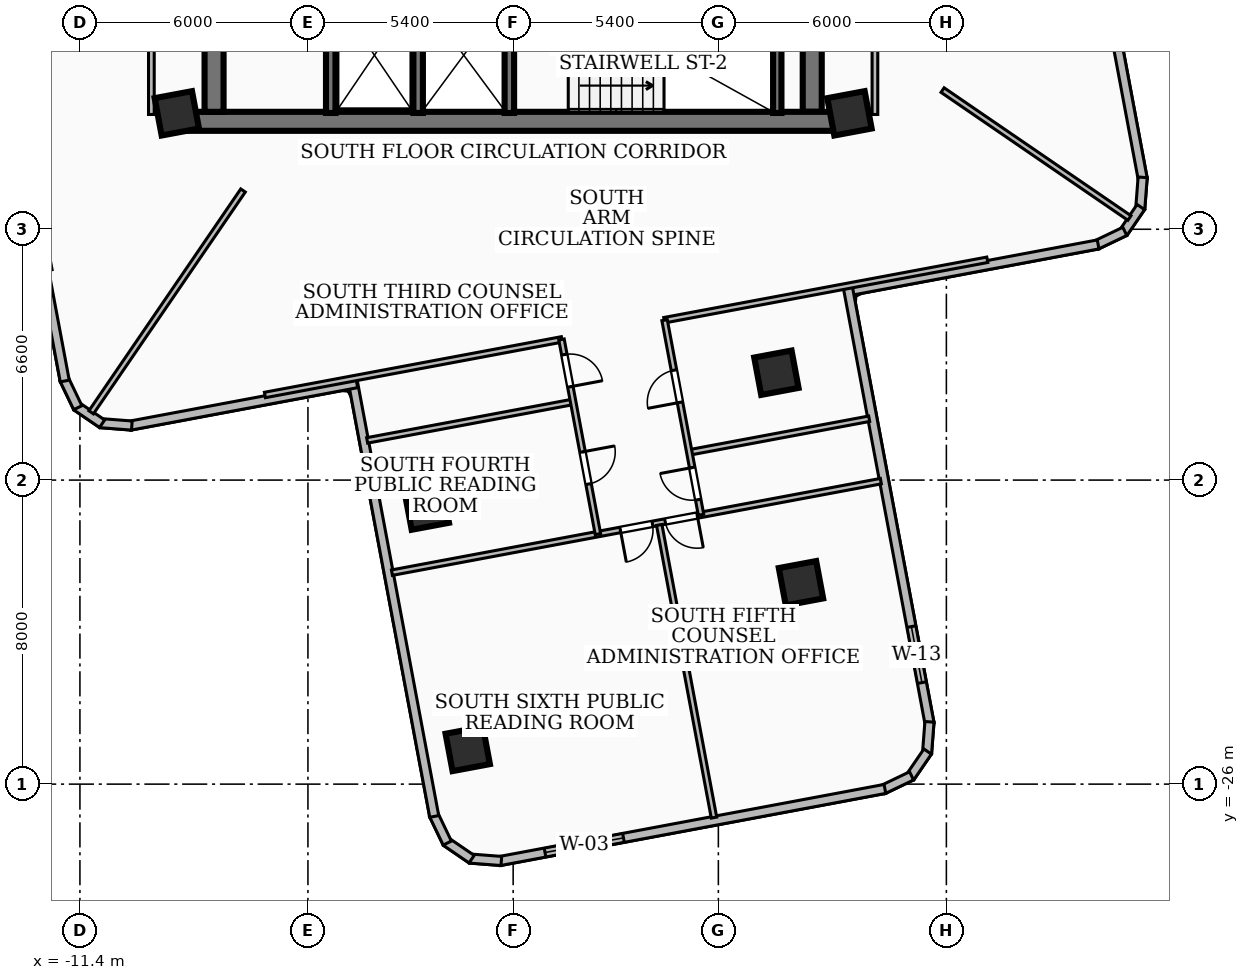
"""IFC4 building model, lengths in metres.
Left out: names, types, materials, properties, quantities, classifications, styles, units other than length and angle.
Written with IfcOpenShell. Run it as: python <this file> out.ifc"""

import sys

from ifc_helpers import new_model, si_unit, direction, frame, frame_2d, origin, origin_2d, place, context, subcontext, project, spatial, rectangle, extrude, element, fill, save


model = new_model("IFC4")
c1 = context("Model", 3, precision=1e-05, world=origin(), true_north=direction((0.0, 1.0)))
c2 = subcontext(c1, "Body", "Model", "MODEL_VIEW")
j1 = project(units=[si_unit("LENGTHUNIT", "METRE"), si_unit("PLANEANGLEUNIT", "RADIAN")], contexts=[c1])
p1 = place(None, origin())
s1 = spatial("IfcSite", under=j1, at=p1, CompositionType="ELEMENT")
p2 = place(p1, origin())
s2 = spatial("IfcBuilding", under=s1, at=p2, CompositionType="ELEMENT")
p3 = place(p2, frame((0.0, 0.0, 103.68)))
s3 = spatial("IfcBuildingStorey", under=s2, at=p3, CompositionType="ELEMENT", Elevation=103.68)
p4 = place(p3, frame((8.78, -8.56, 0.0), z_axis=(0.0, 0.0, 1.0), x_axis=(-1.0, 0.0, 0.0)))
e1 = element("IfcWall", 1, at=p4, inside=s3, PredefinedType="SHEAR", context=c2, shape_type="SweptSolid", body=[
    extrude(rectangle(XDim=17.56, YDim=0.5, at=frame_2d((8.78, 0.0))), origin(), (0.0, 0.0, 1.0), 3.2),
])
for number, where, z_axis, x_axis in (
    (2, (-7.87, -8.31, 0.0), (0.0, 0.0, 1.0), (0.0, 1.0, 0.0)),
    (3, (7.87, -2.0, 0.0), (0.0, 0.0, 1.0), (0.0, -1.0, 0.0)),
):
    element("IfcWall", number, at=place(p3, frame(where, z_axis=z_axis, x_axis=x_axis)), inside=s3, PredefinedType="SHEAR", context=c2, shape_type="SweptSolid", body=[
        extrude(rectangle(XDim=6.31, YDim=0.5, at=frame_2d((3.155, 0.0))), origin(), (0.0, 0.0, 1.0), 3.2),
    ])
p5 = place(p3, frame((6.95, -8.34, 0.0), z_axis=(0.0, 0.0, 1.0), x_axis=(0.0, 1.0, 0.0)))
e4 = element("IfcWall", 4, at=p5, inside=s3, PredefinedType="SOLIDWALL", context=c2, shape_type="SweptSolid", body=[
    extrude(rectangle(XDim=3.06, YDim=0.22, at=frame_2d((1.53, 0.0))), origin(), (0.0, 0.0, 1.0), 3.2),
])
for number, where, z_axis, x_axis in (
    (5, (-0.1, -8.34, 0.0), (0.0, 0.0, 1.0), (0.0, 1.0, 0.0)),
    (6, (-2.5, -8.34, 0.0), (0.0, 0.0, 1.0), (0.0, 1.0, 0.0)),
    (7, (-4.8, -8.34, 0.0), (0.0, 0.0, 1.0), (0.0, 1.0, 0.0)),
):
    element("IfcWall", number, at=place(p3, frame(where, z_axis=z_axis, x_axis=x_axis)), inside=s3, PredefinedType="SOLIDWALL", context=c2, shape_type="SweptSolid", body=[
        extrude(rectangle(XDim=3.04, YDim=0.25, at=frame_2d((1.52, 0.0))), origin(), (0.0, 0.0, 1.0), 3.2),
    ])
for number, where, z_axis, x_axis in (
    (8, (8.85, -8.35, 0.0), (0.0, 0.0, 1.0), (0.983, 0.184, 0.0)),
    (9, (-8.85, -8.35, 0.0), (0.0, 0.0, 1.0), (0.983, 0.184, 0.0)),
    (10, (-2.271, -18.724, 0.0), (0.0, 0.0, 1.0), (0.983, 0.184, 0.0)),
    (11, (6.927, -15.175, 0.0), (0.0, 0.0, 1.0), (0.983, 0.184, 0.0)),
    (12, (-1.195, -25.074, 0.0), (0.0, 0.0, 1.0), (0.983, 0.184, 0.0)),
    (13, (7.574, -20.714, 0.0), (0.0, 0.0, 1.0), (0.983, 0.184, 0.0)),
):
    element("IfcColumn", number, at=place(p3, frame(where, z_axis=z_axis, x_axis=x_axis)), inside=s3, PredefinedType="COLUMN", context=c2, shape_type="SweptSolid", body=[
        extrude(rectangle(XDim=1.0, YDim=1.0, at=origin_2d()), origin(), (0.0, 0.0, 1.0), 3.6),
    ])
p6 = place(p3, frame((15.45, -4.113, 0.0), z_axis=(0.0, 0.0, 1.0), x_axis=(0.18406771587, -0.982913564854, 0.0)))
e14 = element("IfcWall", 14, at=p6, inside=s3, PredefinedType="SOLIDWALL", context=c2, shape_type="SweptSolid", body=[
    extrude(rectangle(XDim=6.075, YDim=0.24, at=frame_2d((3.037, 0.0))), origin(), (0.0, 0.0, 1.0), 3.2),
])
p7 = place(p3, frame((16.565, -10.034, 0.0), z_axis=(0.0, 0.0, 1.0), x_axis=(-0.077011179273, -0.997030229365, 0.0)))
e15 = element("IfcWall", 15, at=p7, inside=s3, PredefinedType="SOLIDWALL", context=c2, shape_type="SweptSolid", body=[
    extrude(rectangle(XDim=0.831, YDim=0.24, at=frame_2d((0.415, 0.0))), origin(), (0.0, 0.0, 1.0), 3.2),
])
p8 = place(p3, frame((16.517, -10.816, 0.0), z_axis=(0.0, 0.0, 1.0), x_axis=(-0.563941688624, -0.825814611055, 0.0)))
e16 = element("IfcWall", 16, at=p8, inside=s3, PredefinedType="SOLIDWALL", context=c2, shape_type="SweptSolid", body=[
    extrude(rectangle(XDim=0.814, YDim=0.24, at=frame_2d((0.407, 0.0))), origin(), (0.0, 0.0, 1.0), 3.2),
])
p9 = place(p3, frame((16.095, -11.456, 0.0), z_axis=(0.0, 0.0, 1.0), x_axis=(-0.902044756706, -0.431642510533, 0.0)))
e17 = element("IfcWall", 17, at=p9, inside=s3, PredefinedType="SOLIDWALL", context=c2, shape_type="SweptSolid", body=[
    extrude(rectangle(XDim=0.832, YDim=0.24, at=frame_2d((0.416, 0.0))), origin(), (0.0, 0.0, 1.0), 3.2),
])
p10 = place(p3, frame((15.393, -11.799, 0.0), z_axis=(0.0, 0.0, 1.0), x_axis=(-0.982891759821, -0.184184115697, 0.0)))
e18 = element("IfcWall", 18, at=p10, inside=s3, PredefinedType="SOLIDWALL", context=c2, shape_type="SweptSolid", body=[
    extrude(rectangle(XDim=6.776, YDim=0.24, at=frame_2d((3.388, 0.0))), origin(), (0.0, 0.0, 1.0), 3.2),
])
p11 = place(p3, frame((8.809, -12.935, 0.0), z_axis=(0.0, 0.0, 1.0), x_axis=(0.184057484564, -0.98291548079, 0.0)))
e19 = element("IfcWall", 19, at=p11, inside=s3, PredefinedType="SOLIDWALL", context=c2, shape_type="SweptSolid", body=[
    extrude(rectangle(XDim=11.675, YDim=0.24, at=frame_2d((5.838, 0.0))), origin(), (0.0, 0.0, 1.0), 3.2),
])
p12 = place(p11, frame((9.075, 0.0, 0.85)))
e20 = element("IfcOpeningElement", 20, at=p12, cuts=e19, PredefinedType="OPENING", context=c2, shape_type="SweptSolid", body=[
    extrude(rectangle(XDim=1.5, YDim=1.8, at=frame_2d((0.75, 0.9))), frame((0.0, 0.13, 0.0), z_axis=(0.0, -1.0, 0.0), x_axis=(1.0, 0.0, 0.0)), (0.0, 0.0, 1.0), 0.26),
])
p13 = place(p3, frame((10.955, -24.361, 0.0), z_axis=(0.0, 0.0, 1.0), x_axis=(-0.077033754987, -0.997028485347, 0.0)))
e21 = element("IfcWall", 21, at=p13, inside=s3, PredefinedType="SOLIDWALL", context=c2, shape_type="SweptSolid", body=[
    extrude(rectangle(XDim=0.83, YDim=0.24, at=frame_2d((0.415, 0.0))), origin(), (0.0, 0.0, 1.0), 3.2),
])
p14 = place(p3, frame((10.907, -25.143, 0.0), z_axis=(0.0, 0.0, 1.0), x_axis=(-0.564898876177, -0.825160141847, 0.0)))
e22 = element("IfcWall", 22, at=p14, inside=s3, PredefinedType="SOLIDWALL", context=c2, shape_type="SweptSolid", body=[
    extrude(rectangle(XDim=0.814, YDim=0.24, at=frame_2d((0.407, 0.0))), origin(), (0.0, 0.0, 1.0), 3.2),
])
p15 = place(p3, frame((10.484, -25.783, 0.0), z_axis=(0.0, 0.0, 1.0), x_axis=(-0.901656054187, -0.432453881874, 0.0)))
e23 = element("IfcWall", 23, at=p15, inside=s3, PredefinedType="SOLIDWALL", context=c2, shape_type="SweptSolid", body=[
    extrude(rectangle(XDim=0.831, YDim=0.24, at=frame_2d((0.415, 0.0))), origin(), (0.0, 0.0, 1.0), 3.2),
])
p16 = place(p3, frame((9.783, -26.126, 0.0), z_axis=(0.0, 0.0, 1.0), x_axis=(-0.98292624202, -0.184000007471, 0.0)))
e24 = element("IfcWall", 24, at=p16, inside=s3, PredefinedType="SOLIDWALL", context=c2, shape_type="SweptSolid", body=[
    extrude(rectangle(XDim=10.32, YDim=0.24, at=frame_2d((5.16, 0.0))), origin(), (0.0, 0.0, 1.0), 3.2),
])
p17 = place(p16, frame((7.0, 0.0, 0.85)))
e25 = element("IfcOpeningElement", 25, at=p17, cuts=e24, PredefinedType="OPENING", context=c2, shape_type="SweptSolid", body=[
    extrude(rectangle(XDim=2.1, YDim=2.0, at=frame_2d((1.05, 1.0))), frame((0.0, 0.13, 0.0), z_axis=(0.0, -1.0, 0.0), x_axis=(1.0, 0.0, 0.0)), (0.0, 0.0, 1.0), 0.26),
])
p18 = place(p3, frame((-0.311, -28.022, 0.0), z_axis=(0.0, 0.0, 1.0), x_axis=(-0.997028485347, 0.077033754987, 0.0)))
e26 = element("IfcWall", 26, at=p18, inside=s3, PredefinedType="SOLIDWALL", context=c2, shape_type="SweptSolid", body=[
    extrude(rectangle(XDim=0.83, YDim=0.24, at=frame_2d((0.415, 0.0))), origin(), (0.0, 0.0, 1.0), 3.2),
])
p19 = place(p3, frame((-1.093, -27.974, 0.0), z_axis=(0.0, 0.0, 1.0), x_axis=(-0.825020375165, 0.565102982263, 0.0)))
e27 = element("IfcWall", 27, at=p19, inside=s3, PredefinedType="SOLIDWALL", context=c2, shape_type="SweptSolid", body=[
    extrude(rectangle(XDim=0.814, YDim=0.24, at=frame_2d((0.407, 0.0))), origin(), (0.0, 0.0, 1.0), 3.2),
])
p20 = place(p3, frame((-1.733, -27.551, 0.0), z_axis=(0.0, 0.0, 1.0), x_axis=(-0.432339276243, 0.901711012585, 0.0)))
e28 = element("IfcWall", 28, at=p20, inside=s3, PredefinedType="SOLIDWALL", context=c2, shape_type="SweptSolid", body=[
    extrude(rectangle(XDim=0.831, YDim=0.24, at=frame_2d((0.415, 0.0))), origin(), (0.0, 0.0, 1.0), 3.2),
])
p21 = place(p3, frame((-2.076, -26.85, 0.0), z_axis=(0.0, 0.0, 1.0), x_axis=(-0.18407390356, 0.982912406081, 0.0)))
e29 = element("IfcWall", 29, at=p21, inside=s3, PredefinedType="SOLIDWALL", context=c2, shape_type="SweptSolid", body=[
    extrude(rectangle(XDim=11.676, YDim=0.24, at=frame_2d((5.838, 0.0))), origin(), (0.0, 0.0, 1.0), 2.346),
])
p22 = place(p3, frame((-4.113, -15.45, 0.0), z_axis=(0.0, 0.0, 1.0), x_axis=(-0.982913564854, -0.18406771587, 0.0)))
e30 = element("IfcWall", 30, at=p22, inside=s3, PredefinedType="SOLIDWALL", context=c2, shape_type="SweptSolid", body=[
    extrude(rectangle(XDim=6.075, YDim=0.24, at=frame_2d((3.037, 0.0))), origin(), (0.0, 0.0, 1.0), 2.346),
])
p23 = place(p3, frame((-10.034, -16.565, 0.0), z_axis=(0.0, 0.0, 1.0), x_axis=(-0.997030229365, 0.077011179273, 0.0)))
e31 = element("IfcWall", 31, at=p23, inside=s3, PredefinedType="SOLIDWALL", context=c2, shape_type="SweptSolid", body=[
    extrude(rectangle(XDim=0.831, YDim=0.24, at=frame_2d((0.415, 0.0))), origin(), (0.0, 0.0, 1.0), 3.2),
])
p24 = place(p3, frame((-10.816, -16.517, 0.0), z_axis=(0.0, 0.0, 1.0), x_axis=(-0.825814611055, 0.563941688624, 0.0)))
e32 = element("IfcWall", 32, at=p24, inside=s3, PredefinedType="SOLIDWALL", context=c2, shape_type="SweptSolid", body=[
    extrude(rectangle(XDim=0.814, YDim=0.24, at=frame_2d((0.407, 0.0))), origin(), (0.0, 0.0, 1.0), 3.2),
])
p25 = place(p3, frame((-11.456, -16.095, 0.0), z_axis=(0.0, 0.0, 1.0), x_axis=(-0.431642510533, 0.902044756706, 0.0)))
e33 = element("IfcWall", 33, at=p25, inside=s3, PredefinedType="SOLIDWALL", context=c2, shape_type="SweptSolid", body=[
    extrude(rectangle(XDim=0.832, YDim=0.24, at=frame_2d((0.416, 0.0))), origin(), (0.0, 0.0, 1.0), 3.2),
])
p26 = place(p3, frame((-11.799, -15.393, 0.0), z_axis=(0.0, 0.0, 1.0), x_axis=(-0.184184115697, 0.982891759821, 0.0)))
e34 = element("IfcWall", 34, at=p26, inside=s3, PredefinedType="SOLIDWALL", context=c2, shape_type="SweptSolid", body=[
    extrude(rectangle(XDim=6.776, YDim=0.24, at=frame_2d((3.388, 0.0))), origin(), (0.0, 0.0, 1.0), 3.2),
])
for number, where, z_axis, x_axis in (
    (35, (-9.52, -8.38, 0.0), (0.0, 0.0, 1.0), (0.0, 1.0, 0.0)),
    (36, (9.52, -8.38, 0.0), (0.0, 0.0, 1.0), (0.0, 1.0, 0.0)),
):
    element("IfcWall", number, at=place(p3, frame(where, z_axis=z_axis, x_axis=x_axis)), inside=s3, PredefinedType="PARTITIONING", context=c2, shape_type="SweptSolid", body=[
        extrude(rectangle(XDim=6.63, YDim=0.15, at=frame_2d((3.315, 0.0))), origin(), (0.0, 0.0, 1.0), 2.346),
    ])
p27 = place(p3, frame((-7.108, -10.38, 0.0), z_axis=(0.0, 0.0, 1.0), x_axis=(-0.564900413187, -0.825159089619, 0.0)))
e37 = element("IfcWall", 37, at=p27, inside=s3, PredefinedType="PARTITIONING", context=c2, shape_type="SweptSolid", body=[
    extrude(rectangle(XDim=7.074, YDim=0.145, at=frame_2d((3.537, 0.0))), origin(), (0.0, 0.0, 1.0), 2.346),
])
p28 = place(p3, frame((11.3, -7.738, 0.0), z_axis=(0.0, 0.0, 1.0), x_axis=(0.825173577049, -0.564879250584, 0.0)))
e38 = element("IfcWall", 38, at=p28, inside=s3, PredefinedType="PARTITIONING", context=c2, shape_type="SweptSolid", body=[
    extrude(rectangle(XDim=5.959, YDim=0.145, at=frame_2d((2.979, 0.0))), origin(), (0.0, 0.0, 1.0), 3.2),
])
for number, where, z_axis, x_axis in (
    (39, (-13.794, -3.975, 0.0), (0.0, 0.0, 1.0), (0.184, -0.983, 0.0)),
    (40, (3.975, -13.794, 0.0), (0.0, 0.0, 1.0), (0.983, 0.184, 0.0)),
):
    element("IfcWall", number, at=place(p3, frame(where, z_axis=z_axis, x_axis=x_axis)), inside=s3, PredefinedType="PARTITIONING", context=c2, shape_type="SweptSolid", body=[
        extrude(rectangle(XDim=8.65, YDim=0.145, at=frame_2d((4.325, 0.0))), origin(), (0.0, 0.0, 1.0), 2.346),
    ])
p29 = place(p3, frame((-6.532, -15.761, 0.0), z_axis=(0.0, 0.0, 1.0), x_axis=(0.98292290903, 0.184017811376, 0.0)))
e41 = element("IfcWall", 41, at=p29, inside=s3, PredefinedType="PARTITIONING", context=c2, shape_type="SweptSolid", body=[
    extrude(rectangle(XDim=7.95, YDim=0.145, at=frame_2d((3.975, 0.0))), origin(), (0.0, 0.0, 1.0), 2.346),
])
p30 = place(p3, frame((4.656, -17.268, 0.0), z_axis=(0.0, 0.0, 1.0), x_axis=(0.982932084341, 0.183968795106, 0.0)))
e42 = element("IfcWall", 42, at=p30, inside=s3, PredefinedType="PARTITIONING", context=c2, shape_type="SweptSolid", body=[
    extrude(rectangle(XDim=4.795, YDim=0.145, at=frame_2d((2.397, 0.0))), origin(), (0.0, 0.0, 1.0), 2.346),
])
p31 = place(p3, frame((-3.842, -16.956, 0.0), z_axis=(0.0, 0.0, 1.0), x_axis=(0.982934991676, 0.183953260746, 0.0)))
e43 = element("IfcWall", 43, at=p31, inside=s3, PredefinedType="PARTITIONING", context=c2, shape_type="SweptSolid", body=[
    extrude(rectangle(XDim=5.496, YDim=0.145, at=frame_2d((2.748, 0.0))), origin(), (0.0, 0.0, 1.0), 2.346),
])
p32 = place(p3, frame((4.944, -18.913, 0.0), z_axis=(0.0, 0.0, 1.0), x_axis=(-0.184062192303, 0.982914599222, 0.0)))
e44 = element("IfcWall", 44, at=p32, inside=s3, PredefinedType="PARTITIONING", context=c2, shape_type="SweptSolid", body=[
    extrude(rectangle(XDim=5.21, YDim=0.145, at=frame_2d((2.605, 0.0))), origin(), (0.0, 0.0, 1.0), 3.2),
])
p33 = place(p32, frame((3.01, 0.0, 0.0)))
e45 = element("IfcOpeningElement", 45, at=p33, cuts=e44, PredefinedType="OPENING", context=c2, shape_type="SweptSolid", body=[
    extrude(rectangle(XDim=0.86, YDim=2.04, at=frame_2d((0.43, 1.02))), frame((0.0, 0.083, 0.0), z_axis=(0.0, -1.0, 0.0), x_axis=(1.0, 0.0, 0.0)), (0.0, 0.0, 1.0), 0.165),
])
p34 = place(p32, frame((0.405, 0.0, 0.0)))
e46 = element("IfcOpeningElement", 46, at=p34, cuts=e44, PredefinedType="OPENING", context=c2, shape_type="SweptSolid", body=[
    extrude(rectangle(XDim=0.86, YDim=2.04, at=frame_2d((0.43, 1.02))), frame((0.0, 0.083, 0.0), z_axis=(0.0, -1.0, 0.0), x_axis=(1.0, 0.0, 0.0)), (0.0, 0.0, 1.0), 0.165),
])
p35 = place(p3, frame((1.272, -14.3, 0.0), z_axis=(0.0, 0.0, 1.0), x_axis=(0.184070670298, -0.982913011581, 0.0)))
e47 = element("IfcWall", 47, at=p35, inside=s3, PredefinedType="PARTITIONING", context=c2, shape_type="SweptSolid", body=[
    extrude(rectangle(XDim=5.21, YDim=0.145, at=frame_2d((2.605, 0.0))), origin(), (0.0, 0.0, 1.0), 3.2),
])
p36 = place(p35, frame((0.405, 0.0, 0.0)))
e48 = element("IfcOpeningElement", 48, at=p36, cuts=e47, PredefinedType="OPENING", context=c2, shape_type="SweptSolid", body=[
    extrude(rectangle(XDim=0.86, YDim=2.04, at=frame_2d((0.43, 1.02))), frame((0.0, 0.083, 0.0), z_axis=(0.0, -1.0, 0.0), x_axis=(1.0, 0.0, 0.0)), (0.0, 0.0, 1.0), 0.165),
])
p37 = place(p35, frame((3.01, 0.0, 0.0)))
e49 = element("IfcOpeningElement", 49, at=p37, cuts=e47, PredefinedType="OPENING", context=c2, shape_type="SweptSolid", body=[
    extrude(rectangle(XDim=0.86, YDim=2.04, at=frame_2d((0.43, 1.02))), frame((0.0, 0.083, 0.0), z_axis=(0.0, -1.0, 0.0), x_axis=(1.0, 0.0, 0.0)), (0.0, 0.0, 1.0), 0.165),
])
p38 = place(p3, frame((3.844, -19.18, 0.0), z_axis=(0.0, 0.0, 1.0), x_axis=(0.183912237739, -0.982942668119, 0.0)))
e50 = element("IfcWall", 50, at=p38, inside=s3, PredefinedType="PARTITIONING", context=c2, shape_type="SweptSolid", body=[
    extrude(rectangle(XDim=7.835, YDim=0.145, at=frame_2d((3.917, 0.0))), origin(), (0.0, 0.0, 1.0), 2.692),
])
p39 = place(p3, frame((9.676, -18.028, 0.0), z_axis=(0.0, 0.0, 1.0), x_axis=(-0.98293315623, -0.183963067988, 0.0)))
e51 = element("IfcWall", 51, at=p39, inside=s3, PredefinedType="PARTITIONING", context=c2, shape_type="SweptSolid", body=[
    extrude(rectangle(XDim=13.089, YDim=0.145, at=frame_2d((6.545, 0.0))), origin(), (0.0, 0.0, 1.0), 2.346),
])
p40 = place(p39, frame((6.115, 0.0, 0.0)))
e52 = element("IfcOpeningElement", 52, at=p40, cuts=e51, PredefinedType="OPENING", context=c2, shape_type="SweptSolid", body=[
    extrude(rectangle(XDim=0.86, YDim=2.04, at=frame_2d((0.43, 1.02))), frame((0.0, 0.083, 0.0), z_axis=(0.0, -1.0, 0.0), x_axis=(1.0, 0.0, 0.0)), (0.0, 0.0, 1.0), 0.165),
])
p41 = place(p39, frame((4.915, 0.0, 0.0)))
e53 = element("IfcOpeningElement", 53, at=p41, cuts=e51, PredefinedType="OPENING", context=c2, shape_type="SweptSolid", body=[
    extrude(rectangle(XDim=0.86, YDim=2.04, at=frame_2d((0.43, 1.02))), frame((0.0, 0.083, 0.0), z_axis=(0.0, -1.0, 0.0), x_axis=(1.0, 0.0, 0.0)), (0.0, 0.0, 1.0), 0.165),
])
p42 = place(p12, origin())
e54 = element("IfcWindow", 54, at=p42, inside=s3, PartitioningType="SINGLE_PANEL", PredefinedType="WINDOW", context=c2, shape_type="SweptSolid", body=[
    extrude(rectangle(XDim=1.5, YDim=1.8, at=frame_2d((0.75, 0.9))), frame((0.0, 0.03, 0.0), z_axis=(0.0, -1.0, 0.0), x_axis=(1.0, 0.0, 0.0)), (0.0, 0.0, 1.0), 0.06),
])
fill(e20, e54)
p43 = place(p17, origin())
e55 = element("IfcWindow", 55, at=p43, inside=s3, PartitioningType="SINGLE_PANEL", PredefinedType="WINDOW", context=c2, shape_type="SweptSolid", body=[
    extrude(rectangle(XDim=2.1, YDim=2.0, at=frame_2d((1.05, 1.0))), frame((0.0, 0.03, 0.0), z_axis=(0.0, -1.0, 0.0), x_axis=(1.0, 0.0, 0.0)), (0.0, 0.0, 1.0), 0.06),
])
fill(e25, e55)
p44 = place(p33, origin())
e56 = element("IfcDoor", 56, at=p44, inside=s3, OperationType="SINGLE_SWING_LEFT", PredefinedType="DOOR", context=c2, shape_type="SweptSolid", body=[
    extrude(rectangle(XDim=0.86, YDim=2.04, at=frame_2d((0.43, 1.02))), frame((0.0, 0.025, 0.0), z_axis=(0.0, -1.0, 0.0), x_axis=(1.0, 0.0, 0.0)), (0.0, 0.0, 1.0), 0.05),
])
fill(e45, e56)
p45 = place(p34, origin())
e57 = element("IfcDoor", 57, at=p45, inside=s3, OperationType="SINGLE_SWING_RIGHT", PredefinedType="DOOR", context=c2, shape_type="SweptSolid", body=[
    extrude(rectangle(XDim=0.86, YDim=2.04, at=frame_2d((0.43, 1.02))), frame((0.0, 0.025, 0.0), z_axis=(0.0, -1.0, 0.0), x_axis=(1.0, 0.0, 0.0)), (0.0, 0.0, 1.0), 0.05),
])
fill(e46, e57)
p46 = place(p36, origin())
e58 = element("IfcDoor", 58, at=p46, inside=s3, OperationType="SINGLE_SWING_RIGHT", PredefinedType="DOOR", context=c2, shape_type="SweptSolid", body=[
    extrude(rectangle(XDim=0.86, YDim=2.04, at=frame_2d((0.43, 1.02))), frame((0.0, 0.025, 0.0), z_axis=(0.0, -1.0, 0.0), x_axis=(1.0, 0.0, 0.0)), (0.0, 0.0, 1.0), 0.05),
])
fill(e48, e58)
p47 = place(p37, origin())
e59 = element("IfcDoor", 59, at=p47, inside=s3, OperationType="SINGLE_SWING_LEFT", PredefinedType="DOOR", context=c2, shape_type="SweptSolid", body=[
    extrude(rectangle(XDim=0.86, YDim=2.04, at=frame_2d((0.43, 1.02))), frame((0.0, 0.025, 0.0), z_axis=(0.0, -1.0, 0.0), x_axis=(1.0, 0.0, 0.0)), (0.0, 0.0, 1.0), 0.05),
])
fill(e49, e59)
p48 = place(p40, origin())
e60 = element("IfcDoor", 60, at=p48, inside=s3, OperationType="SINGLE_SWING_RIGHT", PredefinedType="DOOR", context=c2, shape_type="SweptSolid", body=[
    extrude(rectangle(XDim=0.86, YDim=2.04, at=frame_2d((0.43, 1.02))), frame((0.0, 0.025, 0.0), z_axis=(0.0, -1.0, 0.0), x_axis=(1.0, 0.0, 0.0)), (0.0, 0.0, 1.0), 0.05),
])
fill(e52, e60)
p49 = place(p41, origin())
e61 = element("IfcDoor", 61, at=p49, inside=s3, OperationType="SINGLE_SWING_LEFT", PredefinedType="DOOR", context=c2, shape_type="SweptSolid", body=[
    extrude(rectangle(XDim=0.86, YDim=2.04, at=frame_2d((0.43, 1.02))), frame((0.0, 0.025, 0.0), z_axis=(0.0, -1.0, 0.0), x_axis=(1.0, 0.0, 0.0)), (0.0, 0.0, 1.0), 0.05),
])
fill(e53, e61)
save(model, sys.argv[1])
